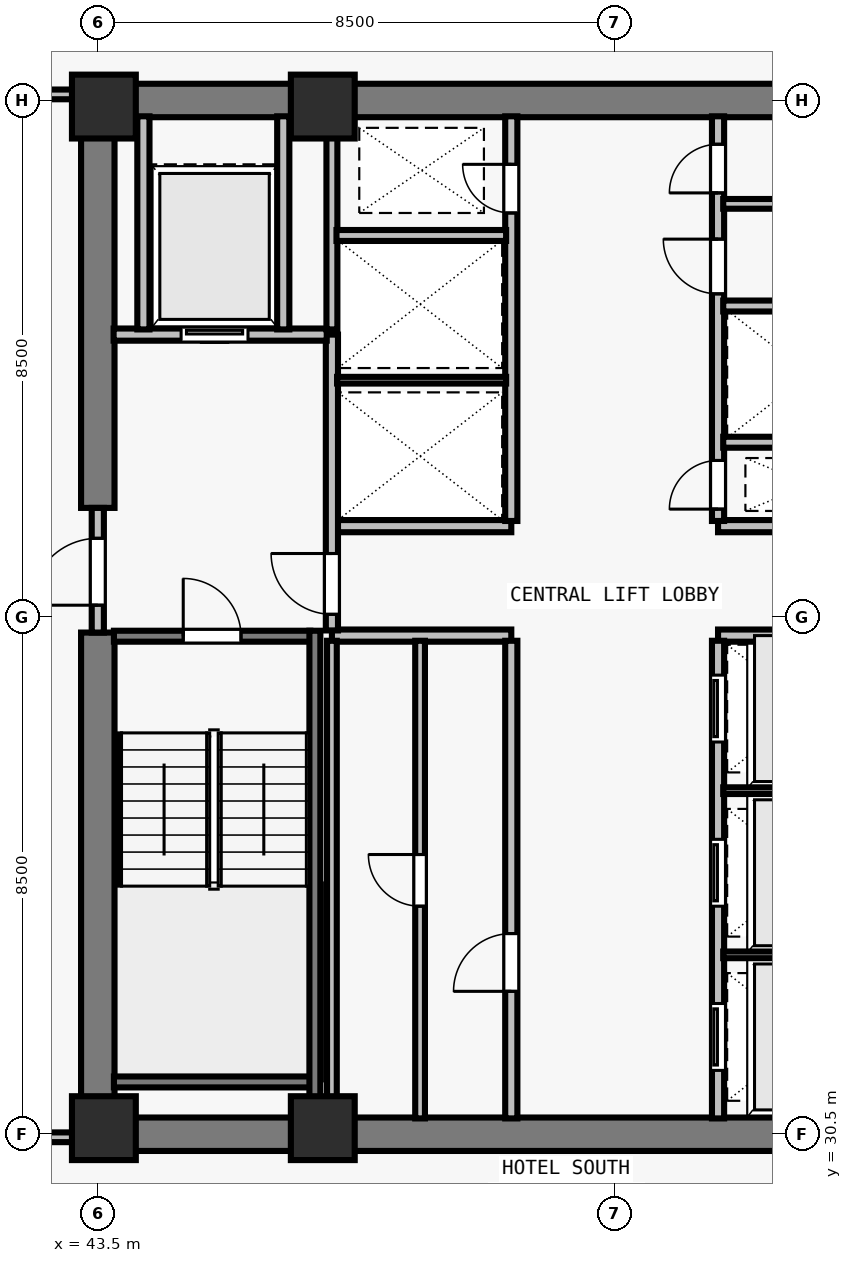
"""IFC4 building model, lengths in metres.
Left out: names, types, materials, properties, quantities, classifications, styles, units other than length and angle.
Written with IfcOpenShell. Run it as: python <this file> out.ifc"""

import sys

from ifc_helpers import new_model, si_unit, direction, frame, frame_2d, origin, origin_2d, place, context, subcontext, project, spatial, rectangle, extrude, element, fill, save


model = new_model("IFC4")
c1 = context("Model", 3, precision=1e-05, world=origin(), true_north=direction((0.0, 1.0)))
c2 = subcontext(c1, "Body", "Model", "MODEL_VIEW")
j1 = project(units=[si_unit("LENGTHUNIT", "METRE"), si_unit("PLANEANGLEUNIT", "RADIAN")], contexts=[c1])
p1 = place(None, origin())
s1 = spatial("IfcSite", under=j1, at=p1, CompositionType="ELEMENT")
p2 = place(p1, origin())
s2 = spatial("IfcBuilding", under=s1, at=p2, CompositionType="ELEMENT")
p3 = place(p2, frame((0.0, 0.0, 123.5)))
s3 = spatial("IfcBuildingStorey", under=s2, at=p3, CompositionType="ELEMENT", Elevation=123.5)
for number, where, z_axis, x_axis in (
    (1, (43.6, 30.6, 0.0), (0.0, 0.0, 1.0), (1.0, 0.0, 0.0)),
    (2, (47.2, 30.6, 0.0), (0.0, 0.0, 1.0), (1.0, 0.0, 0.0)),
    (3, (43.6, 47.4, 0.0), (0.0, 0.0, 1.0), (1.0, 0.0, 0.0)),
    (4, (47.2, 47.4, 0.0), (0.0, 0.0, 1.0), (1.0, 0.0, 0.0)),
):
    element("IfcColumn", number, at=place(p3, frame(where, z_axis=z_axis, x_axis=x_axis)), inside=s3, PredefinedType="COLUMN", context=c2, shape_type="SweptSolid", body=[
        extrude(rectangle(XDim=1.05, YDim=1.05, at=origin_2d()), origin(), (0.0, 0.0, 1.0), 3.5),
    ])
for number, where, z_axis, x_axis in (
    (5, (43.225, 30.5, 0.0), (0.0, 0.0, 1.0), (1.0, 0.0, 0.0)),
    (6, (43.225, 47.5, 0.0), (0.0, 0.0, 1.0), (1.0, 0.0, 0.0)),
):
    element("IfcWall", number, at=place(p3, frame(where, z_axis=z_axis, x_axis=x_axis)), inside=s3, PredefinedType="SHEAR", context=c2, shape_type="SweptSolid", body=[
        extrude(rectangle(XDim=17.55, YDim=0.55, at=frame_2d((8.775, 0.0))), origin(), (0.0, 0.0, 1.0), 3.28),
    ])
p4 = place(p3, frame((43.5, 30.765, 0.0), z_axis=(0.0, 0.0, 1.0), x_axis=(0.0, 1.0, 0.0)))
e7 = element("IfcWall", 7, at=p4, inside=s3, PredefinedType="SHEAR", context=c2, shape_type="SweptSolid", body=[
    extrude(rectangle(XDim=7.985, YDim=0.55, at=frame_2d((3.993, 0.0))), origin(), (0.0, 0.0, 1.0), 3.28),
])
p5 = place(p3, frame((43.5, 40.8, 0.0), z_axis=(0.0, 0.0, 1.0), x_axis=(0.0, 1.0, 0.0)))
e8 = element("IfcWall", 8, at=p5, inside=s3, PredefinedType="SHEAR", context=c2, shape_type="SweptSolid", body=[
    extrude(rectangle(XDim=6.435, YDim=0.55, at=frame_2d((3.218, 0.0))), origin(), (0.0, 0.0, 1.0), 3.28),
])
for number, where, z_axis, x_axis in (
    (9, (47.35, 38.7, 0.0), (0.0, 0.0, 1.0), (1.0, 0.0, 0.0)),
    (10, (47.35, 40.5, 0.0), (0.0, 0.0, 1.0), (1.0, 0.0, 0.0)),
    (11, (53.7, 38.7, 0.0), (0.0, 0.0, 1.0), (1.0, 0.0, 0.0)),
    (12, (53.7, 40.5, 0.0), (0.0, 0.0, 1.0), (1.0, 0.0, 0.0)),
):
    element("IfcWall", number, at=place(p3, frame(where, z_axis=z_axis, x_axis=x_axis)), inside=s3, PredefinedType="SOLIDWALL", context=c2, shape_type="SweptSolid", body=[
        extrude(rectangle(XDim=2.95, YDim=0.2, at=frame_2d((1.475, 0.0))), origin(), (0.0, 0.0, 1.0), 3.28),
    ])
p6 = place(p3, frame((50.3, 30.76, 0.0), z_axis=(0.0, 0.0, 1.0), x_axis=(0.0, 1.0, 0.0)))
e13 = element("IfcWall", 13, at=p6, inside=s3, PredefinedType="SOLIDWALL", context=c2, shape_type="SweptSolid", body=[
    extrude(rectangle(XDim=7.855, YDim=0.2, at=frame_2d((3.927, 0.0))), origin(), (0.0, 0.0, 1.0), 3.28),
])
p7 = place(p6, frame((2.09, 0.0, 0.0)))
e14 = element("IfcOpeningElement", 14, at=p7, cuts=e13, PredefinedType="OPENING", context=c2, shape_type="SweptSolid", body=[
    extrude(rectangle(XDim=0.95, YDim=2.12, at=frame_2d((0.475, 1.06))), frame((0.0, 0.11, 0.0), z_axis=(0.0, -1.0, 0.0), x_axis=(1.0, 0.0, 0.0)), (0.0, 0.0, 1.0), 0.22),
])
p8 = place(p3, frame((53.7, 30.76, 0.0), z_axis=(0.0, 0.0, 1.0), x_axis=(0.0, 1.0, 0.0)))
e15 = element("IfcWall", 15, at=p8, inside=s3, PredefinedType="SOLIDWALL", context=c2, shape_type="SweptSolid", body=[
    extrude(rectangle(XDim=7.855, YDim=0.2, at=frame_2d((3.927, 0.0))), origin(), (0.0, 0.0, 1.0), 3.28),
])
p9 = place(p8, frame((0.79, 0.0, 0.0)))
e16 = element("IfcOpeningElement", 16, at=p9, cuts=e15, PredefinedType="OPENING", context=c2, shape_type="SweptSolid", body=[
    extrude(rectangle(XDim=1.1, YDim=2.2, at=frame_2d((0.55, 1.1))), frame((0.0, 0.11, 0.0), z_axis=(0.0, -1.0, 0.0), x_axis=(1.0, 0.0, 0.0)), (0.0, 0.0, 1.0), 0.22),
])
p10 = place(p8, frame((3.49, 0.0, 0.0)))
e17 = element("IfcOpeningElement", 17, at=p10, cuts=e15, PredefinedType="OPENING", context=c2, shape_type="SweptSolid", body=[
    extrude(rectangle(XDim=1.1, YDim=2.2, at=frame_2d((0.55, 1.1))), frame((0.0, 0.11, 0.0), z_axis=(0.0, -1.0, 0.0), x_axis=(1.0, 0.0, 0.0)), (0.0, 0.0, 1.0), 0.22),
])
p11 = place(p8, frame((6.19, 0.0, 0.0)))
e18 = element("IfcOpeningElement", 18, at=p11, cuts=e15, PredefinedType="OPENING", context=c2, shape_type="SweptSolid", body=[
    extrude(rectangle(XDim=1.1, YDim=2.2, at=frame_2d((0.55, 1.1))), frame((0.0, 0.11, 0.0), z_axis=(0.0, -1.0, 0.0), x_axis=(1.0, 0.0, 0.0)), (0.0, 0.0, 1.0), 0.22),
])
p12 = place(p3, frame((50.3, 40.585, 0.0), z_axis=(0.0, 0.0, 1.0), x_axis=(0.0, 1.0, 0.0)))
e19 = element("IfcWall", 19, at=p12, inside=s3, PredefinedType="SOLIDWALL", context=c2, shape_type="SweptSolid", body=[
    extrude(rectangle(XDim=6.655, YDim=0.2, at=frame_2d((3.328, 0.0))), origin(), (0.0, 0.0, 1.0), 3.28),
])
p13 = place(p12, frame((5.065, 0.0, 0.0)))
e20 = element("IfcOpeningElement", 20, at=p13, cuts=e19, PredefinedType="OPENING", context=c2, shape_type="SweptSolid", body=[
    extrude(rectangle(XDim=0.8, YDim=2.08, at=frame_2d((0.4, 1.04))), frame((0.0, 0.11, 0.0), z_axis=(0.0, -1.0, 0.0), x_axis=(1.0, 0.0, 0.0)), (0.0, 0.0, 1.0), 0.22),
])
p14 = place(p3, frame((53.7, 40.585, 0.0), z_axis=(0.0, 0.0, 1.0), x_axis=(0.0, 1.0, 0.0)))
e21 = element("IfcWall", 21, at=p14, inside=s3, PredefinedType="SOLIDWALL", context=c2, shape_type="SweptSolid", body=[
    extrude(rectangle(XDim=6.655, YDim=0.2, at=frame_2d((3.328, 0.0))), origin(), (0.0, 0.0, 1.0), 3.28),
])
p15 = place(p14, frame((0.195, 0.0, 0.0)))
e22 = element("IfcOpeningElement", 22, at=p15, cuts=e21, PredefinedType="OPENING", context=c2, shape_type="SweptSolid", body=[
    extrude(rectangle(XDim=0.8, YDim=2.08, at=frame_2d((0.4, 1.04))), frame((0.0, 0.11, 0.0), z_axis=(0.0, -1.0, 0.0), x_axis=(1.0, 0.0, 0.0)), (0.0, 0.0, 1.0), 0.22),
])
p16 = place(p14, frame((3.735, 0.0, 0.0)))
e23 = element("IfcOpeningElement", 23, at=p16, cuts=e21, PredefinedType="OPENING", context=c2, shape_type="SweptSolid", body=[
    extrude(rectangle(XDim=0.9, YDim=2.12, at=frame_2d((0.45, 1.06))), frame((0.0, 0.11, 0.0), z_axis=(0.0, -1.0, 0.0), x_axis=(1.0, 0.0, 0.0)), (0.0, 0.0, 1.0), 0.22),
])
p17 = place(p14, frame((5.395, 0.0, 0.0)))
e24 = element("IfcOpeningElement", 24, at=p17, cuts=e21, PredefinedType="OPENING", context=c2, shape_type="SweptSolid", body=[
    extrude(rectangle(XDim=0.8, YDim=2.1, at=frame_2d((0.4, 1.05))), frame((0.0, 0.11, 0.0), z_axis=(0.0, -1.0, 0.0), x_axis=(1.0, 0.0, 0.0)), (0.0, 0.0, 1.0), 0.22),
])
p18 = place(p3, frame((43.5, 38.75, 0.0), z_axis=(0.0, 0.0, 1.0), x_axis=(0.0, 1.0, 0.0)))
e25 = element("IfcWall", 25, at=p18, inside=s3, PredefinedType="SOLIDWALL", context=c2, shape_type="SweptSolid", body=[
    extrude(rectangle(XDim=2.05, YDim=0.2, at=frame_2d((1.025, 0.0))), origin(), (0.0, 0.0, 1.0), 3.28),
])
p19 = place(p18, frame((0.45, 0.0, 0.0)))
e26 = element("IfcOpeningElement", 26, at=p19, cuts=e25, PredefinedType="OPENING", context=c2, shape_type="SweptSolid", body=[
    extrude(rectangle(XDim=1.1, YDim=2.15, at=frame_2d((0.55, 1.075))), frame((0.0, 0.11, 0.0), z_axis=(0.0, -1.0, 0.0), x_axis=(1.0, 0.0, 0.0)), (0.0, 0.0, 1.0), 0.22),
])
p20 = place(p3, frame((47.35, 38.785, 0.0), z_axis=(0.0, 0.0, 1.0), x_axis=(0.0, 1.0, 0.0)))
e27 = element("IfcWall", 27, at=p20, inside=s3, PredefinedType="SOLIDWALL", context=c2, shape_type="SweptSolid", body=[
    extrude(rectangle(XDim=4.865, YDim=0.2, at=frame_2d((2.433, 0.0))), origin(), (0.0, 0.0, 1.0), 3.28),
])
p21 = place(p20, frame((0.265, 0.0, 0.0)))
e28 = element("IfcOpeningElement", 28, at=p21, cuts=e27, PredefinedType="OPENING", context=c2, shape_type="SweptSolid", body=[
    extrude(rectangle(XDim=1.0, YDim=2.15, at=frame_2d((0.5, 1.075))), frame((0.0, 0.11, 0.0), z_axis=(0.0, -1.0, 0.0), x_axis=(1.0, 0.0, 0.0)), (0.0, 0.0, 1.0), 0.22),
])
p22 = place(p3, frame((43.76, 43.65, 0.0), z_axis=(0.0, 0.0, 1.0), x_axis=(1.0, 0.0, 0.0)))
e29 = element("IfcWall", 29, at=p22, inside=s3, PredefinedType="SOLIDWALL", context=c2, shape_type="SweptSolid", body=[
    extrude(rectangle(XDim=3.505, YDim=0.2, at=frame_2d((1.752, 0.0))), origin(), (0.0, 0.0, 1.0), 3.28),
])
p23 = place(p22, frame((1.11, 0.0, 0.0)))
e30 = element("IfcOpeningElement", 30, at=p23, cuts=e29, PredefinedType="OPENING", context=c2, shape_type="SweptSolid", body=[
    extrude(rectangle(XDim=1.1, YDim=2.2, at=frame_2d((0.55, 1.1))), frame((0.0, 0.11, 0.0), z_axis=(0.0, -1.0, 0.0), x_axis=(1.0, 0.0, 0.0)), (0.0, 0.0, 1.0), 0.22),
])
for number, where, z_axis, x_axis in (
    (31, (46.55, 43.735, 0.0), (0.0, 0.0, 1.0), (0.0, 1.0, 0.0)),
    (32, (44.25, 43.735, 0.0), (0.0, 0.0, 1.0), (0.0, 1.0, 0.0)),
):
    element("IfcWall", number, at=place(p3, frame(where, z_axis=z_axis, x_axis=x_axis)), inside=s3, PredefinedType="SOLIDWALL", context=c2, shape_type="SweptSolid", body=[
        extrude(rectangle(XDim=3.505, YDim=0.2, at=frame_2d((1.752, 0.0))), origin(), (0.0, 0.0, 1.0), 3.28),
    ])
p24 = place(p3, frame((47.35, 30.76, 0.0), z_axis=(0.0, 0.0, 1.0), x_axis=(0.0, 1.0, 0.0)))
e33 = element("IfcWall", 33, at=p24, inside=s3, PredefinedType="PARTITIONING", context=c2, shape_type="SweptSolid", body=[
    extrude(rectangle(XDim=7.855, YDim=0.16, at=frame_2d((3.927, 0.0))), origin(), (0.0, 0.0, 1.0), 3.28),
])
p25 = place(p3, frame((48.8, 30.76, 0.0), z_axis=(0.0, 0.0, 1.0), x_axis=(0.0, 1.0, 0.0)))
e34 = element("IfcWall", 34, at=p25, inside=s3, PredefinedType="PARTITIONING", context=c2, shape_type="SweptSolid", body=[
    extrude(rectangle(XDim=7.855, YDim=0.16, at=frame_2d((3.927, 0.0))), origin(), (0.0, 0.0, 1.0), 3.28),
])
p26 = place(p25, frame((3.49, 0.0, 0.0)))
e35 = element("IfcOpeningElement", 35, at=p26, cuts=e34, PredefinedType="OPENING", context=c2, shape_type="SweptSolid", body=[
    extrude(rectangle(XDim=0.85, YDim=2.12, at=frame_2d((0.425, 1.06))), frame((0.0, 0.09, 0.0), z_axis=(0.0, -1.0, 0.0), x_axis=(1.0, 0.0, 0.0)), (0.0, 0.0, 1.0), 0.18),
])
for number, where, z_axis, x_axis in (
    (36, (53.785, 33.45, 0.0), (0.0, 0.0, 1.0), (1.0, 0.0, 0.0)),
    (37, (53.785, 36.15, 0.0), (0.0, 0.0, 1.0), (1.0, 0.0, 0.0)),
):
    element("IfcWall", number, at=place(p3, frame(where, z_axis=z_axis, x_axis=x_axis)), inside=s3, PredefinedType="PARTITIONING", context=c2, shape_type="SweptSolid", body=[
        extrude(rectangle(XDim=2.79, YDim=0.11, at=frame_2d((1.395, 0.0))), origin(), (0.0, 0.0, 1.0), 3.28),
    ])
p27 = place(p3, frame((47.35, 43.735, 0.0), z_axis=(0.0, 0.0, 1.0), x_axis=(0.0, 1.0, 0.0)))
e38 = element("IfcWall", 38, at=p27, inside=s3, PredefinedType="SOLIDWALL", context=c2, shape_type="SweptSolid", body=[
    extrude(rectangle(XDim=3.505, YDim=0.18, at=frame_2d((1.752, 0.0))), origin(), (0.0, 0.0, 1.0), 3.28),
])
p28 = place(p3, frame((47.435, 42.9, 0.0), z_axis=(0.0, 0.0, 1.0), x_axis=(1.0, 0.0, 0.0)))
e39 = element("IfcWall", 39, at=p28, inside=s3, PredefinedType="PARTITIONING", context=c2, shape_type="SweptSolid", body=[
    extrude(rectangle(XDim=2.78, YDim=0.11, at=frame_2d((1.39, 0.0))), origin(), (0.0, 0.0, 1.0), 3.28),
])
p29 = place(p3, frame((47.425, 45.28, 0.0), z_axis=(0.0, 0.0, 1.0), x_axis=(1.0, 0.0, 0.0)))
e40 = element("IfcWall", 40, at=p29, inside=s3, PredefinedType="SOLIDWALL", context=c2, shape_type="SweptSolid", body=[
    extrude(rectangle(XDim=2.79, YDim=0.18, at=frame_2d((1.395, 0.0))), origin(), (0.0, 0.0, 1.0), 3.28),
])
p30 = place(p3, frame((53.785, 41.88, 0.0), z_axis=(0.0, 0.0, 1.0), x_axis=(1.0, 0.0, 0.0)))
e41 = element("IfcWall", 41, at=p30, inside=s3, PredefinedType="SOLIDWALL", context=c2, shape_type="SweptSolid", body=[
    extrude(rectangle(XDim=2.78, YDim=0.18, at=frame_2d((1.39, 0.0))), origin(), (0.0, 0.0, 1.0), 3.28),
])
p31 = place(p3, frame((53.785, 44.12, 0.0), z_axis=(0.0, 0.0, 1.0), x_axis=(1.0, 0.0, 0.0)))
e42 = element("IfcWall", 42, at=p31, inside=s3, PredefinedType="SOLIDWALL", context=c2, shape_type="SweptSolid", body=[
    extrude(rectangle(XDim=2.79, YDim=0.18, at=frame_2d((1.395, 0.0))), origin(), (0.0, 0.0, 1.0), 3.28),
])
p32 = place(p3, frame((53.785, 45.8, 0.0), z_axis=(0.0, 0.0, 1.0), x_axis=(1.0, 0.0, 0.0)))
e43 = element("IfcWall", 43, at=p32, inside=s3, PredefinedType="PARTITIONING", context=c2, shape_type="SweptSolid", body=[
    extrude(rectangle(XDim=2.79, YDim=0.16, at=frame_2d((1.395, 0.0))), origin(), (0.0, 0.0, 1.0), 3.28),
])
p33 = place(p3, frame((40.1, 30.45, 0.0), z_axis=(0.0, 0.0, 1.0), x_axis=(1.0, 0.0, 0.0)))
e44 = element("IfcWall", 44, at=p33, inside=s3, PredefinedType="PARTITIONING", context=c2, shape_type="SweptSolid", body=[
    extrude(rectangle(XDim=3.135, YDim=0.16, at=frame_2d((1.567, 0.0))), origin(), (0.0, 0.0, 1.0), 3.28),
])
p34 = place(p3, frame((40.165, 47.6, 0.0), z_axis=(0.0, 0.0, 1.0), x_axis=(1.0, 0.0, 0.0)))
e45 = element("IfcWall", 45, at=p34, inside=s3, PredefinedType="PARTITIONING", context=c2, shape_type="SweptSolid", body=[
    extrude(rectangle(XDim=3.07, YDim=0.16, at=frame_2d((1.535, 0.0))), origin(), (0.0, 0.0, 1.0), 3.28),
])
p35 = place(p3, frame((43.765, 38.69, 0.0), z_axis=(0.0, 0.0, 1.0), x_axis=(1.0, 0.0, 0.0)))
e46 = element("IfcWall", 46, at=p35, inside=s3, PredefinedType="SOLIDWALL", context=c2, shape_type="SweptSolid", body=[
    extrude(rectangle(XDim=3.23, YDim=0.18, at=frame_2d((1.615, 0.0))), origin(), (0.0, 0.0, 1.0), 3.28),
])
p36 = place(p35, frame((1.14, 0.0, 0.0)))
e47 = element("IfcOpeningElement", 47, at=p36, cuts=e46, PredefinedType="OPENING", context=c2, shape_type="SweptSolid", body=[
    extrude(rectangle(XDim=0.95, YDim=2.15, at=frame_2d((0.475, 1.075))), frame((0.0, 0.1, 0.0), z_axis=(0.0, -1.0, 0.0), x_axis=(1.0, 0.0, 0.0)), (0.0, 0.0, 1.0), 0.2),
])
p37 = place(p3, frame((43.765, 31.36, 0.0), z_axis=(0.0, 0.0, 1.0), x_axis=(1.0, 0.0, 0.0)))
e48 = element("IfcWall", 48, at=p37, inside=s3, PredefinedType="SOLIDWALL", context=c2, shape_type="SweptSolid", body=[
    extrude(rectangle(XDim=3.23, YDim=0.18, at=frame_2d((1.615, 0.0))), origin(), (0.0, 0.0, 1.0), 3.28),
])
p38 = place(p3, frame((47.07, 38.78, 0.0), z_axis=(0.0, 0.0, 1.0), x_axis=(0.0, -1.0, 0.0)))
e49 = element("IfcWall", 49, at=p38, inside=s3, PredefinedType="SOLIDWALL", context=c2, shape_type="SweptSolid", body=[
    extrude(rectangle(XDim=8.017, YDim=0.18, at=frame_2d((4.009, 0.0))), origin(), (0.0, 0.0, 1.0), 3.28),
])
p39 = place(p19, origin())
e50 = element("IfcDoor", 50, at=p39, inside=s3, OperationType="SINGLE_SWING_LEFT", PredefinedType="DOOR", context=c2, shape_type="SweptSolid", body=[
    extrude(rectangle(XDim=1.1, YDim=2.15, at=frame_2d((0.55, 1.075))), frame((0.0, 0.025, 0.0), z_axis=(0.0, -1.0, 0.0), x_axis=(1.0, 0.0, 0.0)), (0.0, 0.0, 1.0), 0.05),
])
fill(e26, e50)
p40 = place(p21, origin())
e51 = element("IfcDoor", 51, at=p40, inside=s3, OperationType="SINGLE_SWING_RIGHT", PredefinedType="DOOR", context=c2, shape_type="SweptSolid", body=[
    extrude(rectangle(XDim=1.0, YDim=2.15, at=frame_2d((0.5, 1.075))), frame((0.0, 0.025, 0.0), z_axis=(0.0, -1.0, 0.0), x_axis=(1.0, 0.0, 0.0)), (0.0, 0.0, 1.0), 0.05),
])
fill(e28, e51)
p41 = place(p23, origin())
e52 = element("IfcDoor", 52, at=p41, inside=s3, OperationType="SLIDING_TO_LEFT", PredefinedType="DOOR", context=c2, shape_type="SweptSolid", body=[
    extrude(rectangle(XDim=1.1, YDim=2.2, at=frame_2d((0.55, 1.1))), frame((0.0, 0.025, 0.0), z_axis=(0.0, -1.0, 0.0), x_axis=(1.0, 0.0, 0.0)), (0.0, 0.0, 1.0), 0.05),
])
fill(e30, e52)
p42 = place(p7, origin())
e53 = element("IfcDoor", 53, at=p42, inside=s3, OperationType="SINGLE_SWING_LEFT", PredefinedType="DOOR", context=c2, shape_type="SweptSolid", body=[
    extrude(rectangle(XDim=0.95, YDim=2.12, at=frame_2d((0.475, 1.06))), frame((0.0, 0.025, 0.0), z_axis=(0.0, -1.0, 0.0), x_axis=(1.0, 0.0, 0.0)), (0.0, 0.0, 1.0), 0.05),
])
fill(e14, e53)
p43 = place(p26, origin())
e54 = element("IfcDoor", 54, at=p43, inside=s3, OperationType="SINGLE_SWING_RIGHT", PredefinedType="DOOR", context=c2, shape_type="SweptSolid", body=[
    extrude(rectangle(XDim=0.85, YDim=2.12, at=frame_2d((0.425, 1.06))), frame((0.0, 0.025, 0.0), z_axis=(0.0, -1.0, 0.0), x_axis=(1.0, 0.0, 0.0)), (0.0, 0.0, 1.0), 0.05),
])
fill(e35, e54)
p44 = place(p9, origin())
e55 = element("IfcDoor", 55, at=p44, inside=s3, OperationType="SLIDING_TO_LEFT", PredefinedType="DOOR", context=c2, shape_type="SweptSolid", body=[
    extrude(rectangle(XDim=1.1, YDim=2.2, at=frame_2d((0.55, 1.1))), frame((0.0, 0.025, 0.0), z_axis=(0.0, -1.0, 0.0), x_axis=(1.0, 0.0, 0.0)), (0.0, 0.0, 1.0), 0.05),
])
fill(e16, e55)
p45 = place(p10, origin())
e56 = element("IfcDoor", 56, at=p45, inside=s3, OperationType="SLIDING_TO_LEFT", PredefinedType="DOOR", context=c2, shape_type="SweptSolid", body=[
    extrude(rectangle(XDim=1.1, YDim=2.2, at=frame_2d((0.55, 1.1))), frame((0.0, 0.025, 0.0), z_axis=(0.0, -1.0, 0.0), x_axis=(1.0, 0.0, 0.0)), (0.0, 0.0, 1.0), 0.05),
])
fill(e17, e56)
p46 = place(p11, origin())
e57 = element("IfcDoor", 57, at=p46, inside=s3, OperationType="SLIDING_TO_LEFT", PredefinedType="DOOR", context=c2, shape_type="SweptSolid", body=[
    extrude(rectangle(XDim=1.1, YDim=2.2, at=frame_2d((0.55, 1.1))), frame((0.0, 0.025, 0.0), z_axis=(0.0, -1.0, 0.0), x_axis=(1.0, 0.0, 0.0)), (0.0, 0.0, 1.0), 0.05),
])
fill(e18, e57)
p47 = place(p13, origin())
e58 = element("IfcDoor", 58, at=p47, inside=s3, OperationType="SINGLE_SWING_RIGHT", PredefinedType="DOOR", context=c2, shape_type="SweptSolid", body=[
    extrude(rectangle(XDim=0.8, YDim=2.08, at=frame_2d((0.4, 1.04))), frame((0.0, 0.025, 0.0), z_axis=(0.0, -1.0, 0.0), x_axis=(1.0, 0.0, 0.0)), (0.0, 0.0, 1.0), 0.05),
])
fill(e20, e58)
p48 = place(p15, origin())
e59 = element("IfcDoor", 59, at=p48, inside=s3, OperationType="SINGLE_SWING_LEFT", PredefinedType="DOOR", context=c2, shape_type="SweptSolid", body=[
    extrude(rectangle(XDim=0.8, YDim=2.08, at=frame_2d((0.4, 1.04))), frame((0.0, 0.025, 0.0), z_axis=(0.0, -1.0, 0.0), x_axis=(1.0, 0.0, 0.0)), (0.0, 0.0, 1.0), 0.05),
])
fill(e22, e59)
p49 = place(p16, origin())
e60 = element("IfcDoor", 60, at=p49, inside=s3, OperationType="SINGLE_SWING_RIGHT", PredefinedType="DOOR", context=c2, shape_type="SweptSolid", body=[
    extrude(rectangle(XDim=0.9, YDim=2.12, at=frame_2d((0.45, 1.06))), frame((0.0, 0.025, 0.0), z_axis=(0.0, -1.0, 0.0), x_axis=(1.0, 0.0, 0.0)), (0.0, 0.0, 1.0), 0.05),
])
fill(e23, e60)
p50 = place(p17, origin())
e61 = element("IfcDoor", 61, at=p50, inside=s3, OperationType="SINGLE_SWING_LEFT", PredefinedType="DOOR", context=c2, shape_type="SweptSolid", body=[
    extrude(rectangle(XDim=0.8, YDim=2.1, at=frame_2d((0.4, 1.05))), frame((0.0, 0.025, 0.0), z_axis=(0.0, -1.0, 0.0), x_axis=(1.0, 0.0, 0.0)), (0.0, 0.0, 1.0), 0.05),
])
fill(e24, e61)
p51 = place(p36, origin())
e62 = element("IfcDoor", 62, at=p51, inside=s3, OperationType="SINGLE_SWING_LEFT", PredefinedType="DOOR", context=c2, shape_type="SweptSolid", body=[
    extrude(rectangle(XDim=0.95, YDim=2.15, at=frame_2d((0.475, 1.075))), frame((0.0, 0.025, 0.0), z_axis=(0.0, -1.0, 0.0), x_axis=(1.0, 0.0, 0.0)), (0.0, 0.0, 1.0), 0.05),
])
fill(e47, e62)
save(model, sys.argv[1])
